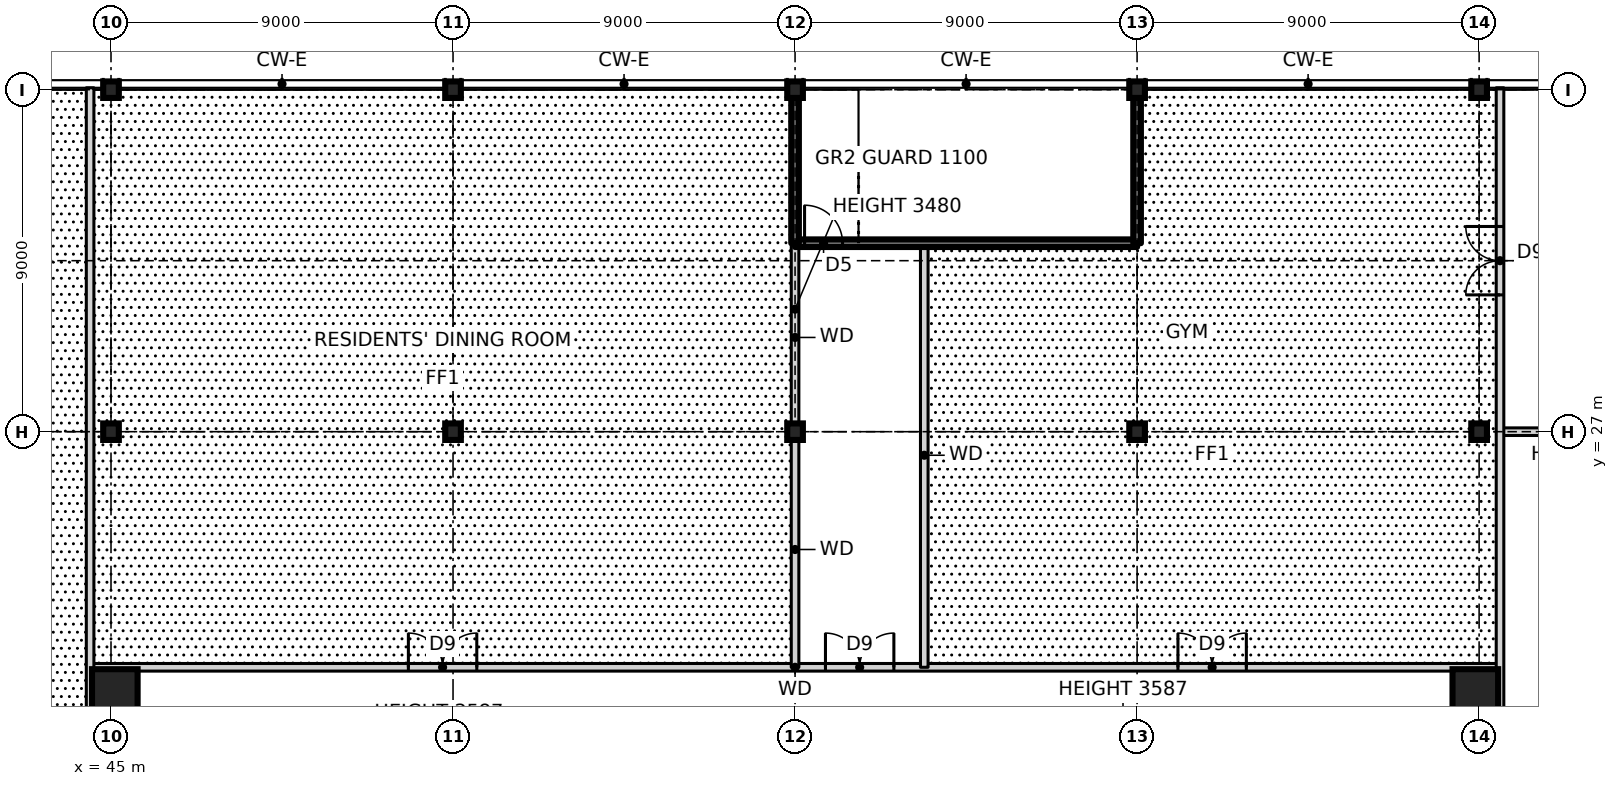
"""IFC4 building model, lengths in metres.
Left out: names, types, materials, properties, quantities, classifications, styles, units other than length and angle.
Written with IfcOpenShell. Run it as: python <this file> out.ifc"""

import sys

from ifc_helpers import new_model, si_unit, direction, frame, frame_2d, origin, origin_2d, place, context, subcontext, project, spatial, rectangle, hollow_rectangle, i_section, extrude, element, fill, save


model = new_model("IFC4")
c1 = context("Model", 3, precision=1e-05, world=origin(), true_north=direction((0.0, 1.0)))
c2 = subcontext(c1, "Body", "Model", "MODEL_VIEW")
j1 = project(units=[si_unit("LENGTHUNIT", "METRE"), si_unit("PLANEANGLEUNIT", "RADIAN")], contexts=[c1])
p1 = place(None, origin())
s1 = spatial("IfcSite", under=j1, at=p1, CompositionType="ELEMENT")
p2 = place(p1, origin())
s2 = spatial("IfcBuilding", under=s1, at=p2, CompositionType="ELEMENT")
p3 = place(p2, frame((0.0, 0.0, 10.5)))
s3 = spatial("IfcBuildingStorey", under=s2, at=p3, CompositionType="ELEMENT", Elevation=10.5)
for number, where, z_axis, x_axis in (
    (1, (80.9, 20.15, 0.0), (0.0, 0.0, 1.0), (1.0, 0.0, 0.0)),
    (2, (45.1, 20.15, 0.0), (0.0, 0.0, 1.0), (1.0, 0.0, 0.0)),
):
    element("IfcColumn", number, at=place(p3, frame(where, z_axis=z_axis, x_axis=x_axis)), inside=s3, PredefinedType="COLUMN", context=c2, shape_type="SweptSolid", body=[
        extrude(hollow_rectangle(XDim=1.2, YDim=1.2, WallThickness=0.07, at=origin_2d()), origin(), (0.0, 0.0, 1.0), 4.5),
    ])
for number, where, z_axis, x_axis in (
    (3, (45.0, 27.0, 0.0), (0.0, 0.0, 1.0), (1.0, 0.0, 0.0)),
    (4, (45.0, 36.0, 0.0), (0.0, 0.0, 1.0), (1.0, 0.0, 0.0)),
    (5, (54.0, 27.0, 0.0), (0.0, 0.0, 1.0), (1.0, 0.0, 0.0)),
    (6, (54.0, 36.0, 0.0), (0.0, 0.0, 1.0), (1.0, 0.0, 0.0)),
    (7, (63.0, 27.0, 0.0), (0.0, 0.0, 1.0), (1.0, 0.0, 0.0)),
    (8, (63.0, 36.0, 0.0), (0.0, 0.0, 1.0), (1.0, 0.0, 0.0)),
    (9, (72.0, 27.0, 0.0), (0.0, 0.0, 1.0), (1.0, 0.0, 0.0)),
    (10, (72.0, 36.0, 0.0), (0.0, 0.0, 1.0), (1.0, 0.0, 0.0)),
    (11, (81.0, 27.0, 0.0), (0.0, 0.0, 1.0), (1.0, 0.0, 0.0)),
    (12, (81.0, 36.0, 0.0), (0.0, 0.0, 1.0), (1.0, 0.0, 0.0)),
):
    element("IfcColumn", number, at=place(p3, frame(where, z_axis=z_axis, x_axis=x_axis)), inside=s3, PredefinedType="COLUMN", context=c2, shape_type="SweptSolid", body=[
        extrude(i_section(OverallWidth=0.411, OverallDepth=0.434, WebThickness=0.036, FlangeThickness=0.057, at=origin_2d()), origin(), (0.0, 0.0, 1.0), 4.5),
    ])
p4 = place(p3, frame((44.45, 20.8, 0.0), z_axis=(0.0, 0.0, 1.0), x_axis=(1.0, 0.0, 0.0)))
e13 = element("IfcWall", 13, at=p4, inside=s3, PredefinedType="SOLIDWALL", context=c2, shape_type="SweptSolid", body=[
    extrude(rectangle(XDim=37.1, YDim=0.2, at=frame_2d((18.55, 0.0))), origin(), (0.0, 0.0, 1.0), 4.25),
])
p5 = place(p4, frame((8.375, 0.0, 0.0)))
e14 = element("IfcOpeningElement", 14, at=p5, cuts=e13, PredefinedType="OPENING", context=c2, shape_type="SweptSolid", body=[
    extrude(rectangle(XDim=1.8, YDim=2.1, at=frame_2d((0.9, 1.05))), frame((0.0, 0.11, 0.0), z_axis=(0.0, -1.0, 0.0), x_axis=(1.0, 0.0, 0.0)), (0.0, 0.0, 1.0), 0.22),
])
p6 = place(p4, frame((28.625, 0.0, 0.0)))
e15 = element("IfcOpeningElement", 15, at=p6, cuts=e13, PredefinedType="OPENING", context=c2, shape_type="SweptSolid", body=[
    extrude(rectangle(XDim=1.8, YDim=2.1, at=frame_2d((0.9, 1.05))), frame((0.0, 0.11, 0.0), z_axis=(0.0, -1.0, 0.0), x_axis=(1.0, 0.0, 0.0)), (0.0, 0.0, 1.0), 0.22),
])
p7 = place(p4, frame((19.35, 0.0, 0.0)))
e16 = element("IfcOpeningElement", 16, at=p7, cuts=e13, PredefinedType="OPENING", context=c2, shape_type="SweptSolid", body=[
    extrude(rectangle(XDim=1.8, YDim=2.1, at=frame_2d((0.9, 1.05))), frame((0.0, 0.11, 0.0), z_axis=(0.0, -1.0, 0.0), x_axis=(1.0, 0.0, 0.0)), (0.0, 0.0, 1.0), 0.22),
])
p8 = place(p3, frame((81.55, 27.0, 0.0), z_axis=(0.0, 0.0, 1.0), x_axis=(1.0, 0.0, 0.0)))
e17 = element("IfcWall", 17, at=p8, inside=s3, PredefinedType="SOLIDWALL", context=c2, shape_type="SweptSolid", body=[
    extrude(rectangle(XDim=8.39, YDim=0.2, at=frame_2d((4.195, 0.0))), origin(), (0.0, 0.0, 1.0), 3.48),
])
p9 = place(p3, frame((63.0, 31.96, 0.0), z_axis=(0.0, 0.0, 1.0), x_axis=(1.0, 0.0, 0.0)))
e18 = element("IfcWall", 18, at=p9, inside=s3, PredefinedType="SOLIDWALL", context=c2, shape_type="SweptSolid", body=[
    extrude(rectangle(XDim=9.0, YDim=0.2, at=frame_2d((4.5, 0.0))), origin(), (0.0, 0.0, 1.0), 4.5),
])
p10 = place(p9, frame((0.25, 0.0, 0.0)))
e19 = element("IfcOpeningElement", 19, at=p10, cuts=e18, PredefinedType="OPENING", context=c2, shape_type="SweptSolid", body=[
    extrude(rectangle(XDim=1.0, YDim=2.1, at=frame_2d((0.5, 1.05))), frame((0.0, 0.11, 0.0), z_axis=(0.0, -1.0, 0.0), x_axis=(1.0, 0.0, 0.0)), (0.0, 0.0, 1.0), 0.22),
])
p11 = place(p3, frame((81.55, -36.05, 0.0), z_axis=(0.0, 0.0, 1.0), x_axis=(0.0, 1.0, 0.0)))
e20 = element("IfcWall", 20, at=p11, inside=s3, PredefinedType="SOLIDWALL", context=c2, shape_type="SweptSolid", body=[
    extrude(rectangle(XDim=72.1, YDim=0.2, at=frame_2d((36.05, 0.0))), origin(), (0.0, 0.0, 1.0), 4.25),
])
p12 = place(p11, frame((66.65, 0.0, 0.0)))
e21 = element("IfcOpeningElement", 21, at=p12, cuts=e20, PredefinedType="OPENING", context=c2, shape_type="SweptSolid", body=[
    extrude(rectangle(XDim=1.8, YDim=2.1, at=frame_2d((0.9, 1.05))), frame((0.0, 0.11, 0.0), z_axis=(0.0, -1.0, 0.0), x_axis=(1.0, 0.0, 0.0)), (0.0, 0.0, 1.0), 0.22),
])
p13 = place(p11, frame((23.05, 0.0, 0.0)))
e22 = element("IfcOpeningElement", 22, at=p13, cuts=e20, PredefinedType="OPENING", context=c2, shape_type="SweptSolid", body=[
    extrude(rectangle(XDim=1.8, YDim=2.1, at=frame_2d((0.9, 1.05))), frame((0.0, 0.11, 0.0), z_axis=(0.0, -1.0, 0.0), x_axis=(1.0, 0.0, 0.0)), (0.0, 0.0, 1.0), 0.22),
])
p14 = place(p11, frame((35.45, 0.0, 0.0)))
e23 = element("IfcOpeningElement", 23, at=p14, cuts=e20, PredefinedType="OPENING", context=c2, shape_type="SweptSolid", body=[
    extrude(rectangle(XDim=1.8, YDim=2.1, at=frame_2d((0.9, 1.05))), frame((0.0, 0.11, 0.0), z_axis=(0.0, -1.0, 0.0), x_axis=(1.0, 0.0, 0.0)), (0.0, 0.0, 1.0), 0.22),
])
p15 = place(p11, frame((47.55, 0.0, 0.0)))
e24 = element("IfcOpeningElement", 24, at=p15, cuts=e20, PredefinedType="OPENING", context=c2, shape_type="SweptSolid", body=[
    extrude(rectangle(XDim=1.8, YDim=2.1, at=frame_2d((0.9, 1.05))), frame((0.0, 0.11, 0.0), z_axis=(0.0, -1.0, 0.0), x_axis=(1.0, 0.0, 0.0)), (0.0, 0.0, 1.0), 0.22),
])
p16 = place(p3, frame((72.0, 31.96, 0.0), z_axis=(0.0, 0.0, 1.0), x_axis=(0.0, 1.0, 0.0)))
e25 = element("IfcWall", 25, at=p16, inside=s3, PredefinedType="SOLIDWALL", context=c2, shape_type="SweptSolid", body=[
    extrude(rectangle(XDim=3.823, YDim=0.2, at=frame_2d((1.911, 0.0))), origin(), (0.0, 0.0, 1.0), 4.5),
])
p17 = place(p3, frame((66.4, 20.8, 0.0), z_axis=(0.0, 0.0, 1.0), x_axis=(0.0, 1.0, 0.0)))
e26 = element("IfcWall", 26, at=p17, inside=s3, PredefinedType="SOLIDWALL", context=c2, shape_type="SweptSolid", body=[
    extrude(rectangle(XDim=11.16, YDim=0.2, at=frame_2d((5.58, 0.0))), origin(), (0.0, 0.0, 1.0), 4.25),
])
p18 = place(p3, frame((63.0, 20.8, 0.0), z_axis=(0.0, 0.0, 1.0), x_axis=(0.0, 1.0, 0.0)))
e27 = element("IfcWall", 27, at=p18, inside=s3, PredefinedType="SOLIDWALL", context=c2, shape_type="SweptSolid", body=[
    extrude(rectangle(XDim=6.2, YDim=0.2, at=frame_2d((3.1, 0.0))), origin(), (0.0, 0.0, 1.0), 4.25),
])
p19 = place(p3, frame((63.0, 31.96, 0.0), z_axis=(0.0, 0.0, 1.0), x_axis=(0.0, 1.0, 0.0)))
e28 = element("IfcWall", 28, at=p19, inside=s3, PredefinedType="SOLIDWALL", context=c2, shape_type="SweptSolid", body=[
    extrude(rectangle(XDim=3.823, YDim=0.2, at=frame_2d((1.911, 0.0))), origin(), (0.0, 0.0, 1.0), 4.5),
])
p20 = place(p3, frame((44.45, -36.05, 0.0), z_axis=(0.0, 0.0, 1.0), x_axis=(0.0, 1.0, 0.0)))
e29 = element("IfcWall", 29, at=p20, inside=s3, PredefinedType="SOLIDWALL", context=c2, shape_type="SweptSolid", body=[
    extrude(rectangle(XDim=72.1, YDim=0.2, at=frame_2d((36.05, 0.0))), origin(), (0.0, 0.0, 1.0), 4.25),
])
p21 = place(p20, frame((24.75, 0.0, 0.0)))
e30 = element("IfcOpeningElement", 30, at=p21, cuts=e29, PredefinedType="OPENING", context=c2, shape_type="SweptSolid", body=[
    extrude(rectangle(XDim=1.8, YDim=2.1, at=frame_2d((0.9, 1.05))), frame((0.0, 0.11, 0.0), z_axis=(0.0, -1.0, 0.0), x_axis=(1.0, 0.0, 0.0)), (0.0, 0.0, 1.0), 0.22),
])
p22 = place(p20, frame((45.55, 0.0, 0.0)))
e31 = element("IfcOpeningElement", 31, at=p22, cuts=e29, PredefinedType="OPENING", context=c2, shape_type="SweptSolid", body=[
    extrude(rectangle(XDim=1.8, YDim=2.1, at=frame_2d((0.9, 1.05))), frame((0.0, 0.11, 0.0), z_axis=(0.0, -1.0, 0.0), x_axis=(1.0, 0.0, 0.0)), (0.0, 0.0, 1.0), 0.22),
])
p23 = place(p3, frame((63.0, 27.0, 0.0), z_axis=(0.0, 0.0, 1.0), x_axis=(0.0, 1.0, 0.0)))
e32 = element("IfcWall", 32, at=p23, inside=s3, PredefinedType="SOLIDWALL", context=c2, shape_type="SweptSolid", body=[
    extrude(rectangle(XDim=4.96, YDim=0.2, at=frame_2d((2.48, 0.0))), origin(), (0.0, 0.0, 1.0), 3.48),
])
p24 = place(p5, origin())
e33 = element("IfcDoor", 33, at=p24, inside=s3, OperationType="DOUBLE_DOOR_SINGLE_SWING", PredefinedType="DOOR", context=c2, shape_type="SweptSolid", body=[
    extrude(rectangle(XDim=1.8, YDim=2.1, at=frame_2d((0.9, 1.05))), frame((0.0, 0.025, 0.0), z_axis=(0.0, -1.0, 0.0), x_axis=(1.0, 0.0, 0.0)), (0.0, 0.0, 1.0), 0.05),
])
fill(e14, e33)
p25 = place(p6, origin())
e34 = element("IfcDoor", 34, at=p25, inside=s3, OperationType="DOUBLE_DOOR_SINGLE_SWING", PredefinedType="DOOR", context=c2, shape_type="SweptSolid", body=[
    extrude(rectangle(XDim=1.8, YDim=2.1, at=frame_2d((0.9, 1.05))), frame((0.0, 0.025, 0.0), z_axis=(0.0, -1.0, 0.0), x_axis=(1.0, 0.0, 0.0)), (0.0, 0.0, 1.0), 0.05),
])
fill(e15, e34)
p26 = place(p12, origin())
e35 = element("IfcDoor", 35, at=p26, inside=s3, OperationType="DOUBLE_DOOR_SINGLE_SWING", PredefinedType="DOOR", context=c2, shape_type="SweptSolid", body=[
    extrude(rectangle(XDim=1.8, YDim=2.1, at=frame_2d((0.9, 1.05))), frame((0.0, 0.025, 0.0), z_axis=(0.0, -1.0, 0.0), x_axis=(1.0, 0.0, 0.0)), (0.0, 0.0, 1.0), 0.05),
])
fill(e21, e35)
p27 = place(p7, origin())
e36 = element("IfcDoor", 36, at=p27, inside=s3, OperationType="DOUBLE_DOOR_SINGLE_SWING", PredefinedType="DOOR", context=c2, shape_type="SweptSolid", body=[
    extrude(rectangle(XDim=1.8, YDim=2.1, at=frame_2d((0.9, 1.05))), frame((0.0, 0.025, 0.0), z_axis=(0.0, -1.0, 0.0), x_axis=(1.0, 0.0, 0.0)), (0.0, 0.0, 1.0), 0.05),
])
fill(e16, e36)
p28 = place(p10, origin())
e37 = element("IfcDoor", 37, at=p28, inside=s3, OperationType="SINGLE_SWING_LEFT", PredefinedType="DOOR", context=c2, shape_type="SweptSolid", body=[
    extrude(rectangle(XDim=1.0, YDim=2.1, at=frame_2d((0.5, 1.05))), frame((0.0, 0.025, 0.0), z_axis=(0.0, -1.0, 0.0), x_axis=(1.0, 0.0, 0.0)), (0.0, 0.0, 1.0), 0.05),
])
fill(e19, e37)
save(model, sys.argv[1])
